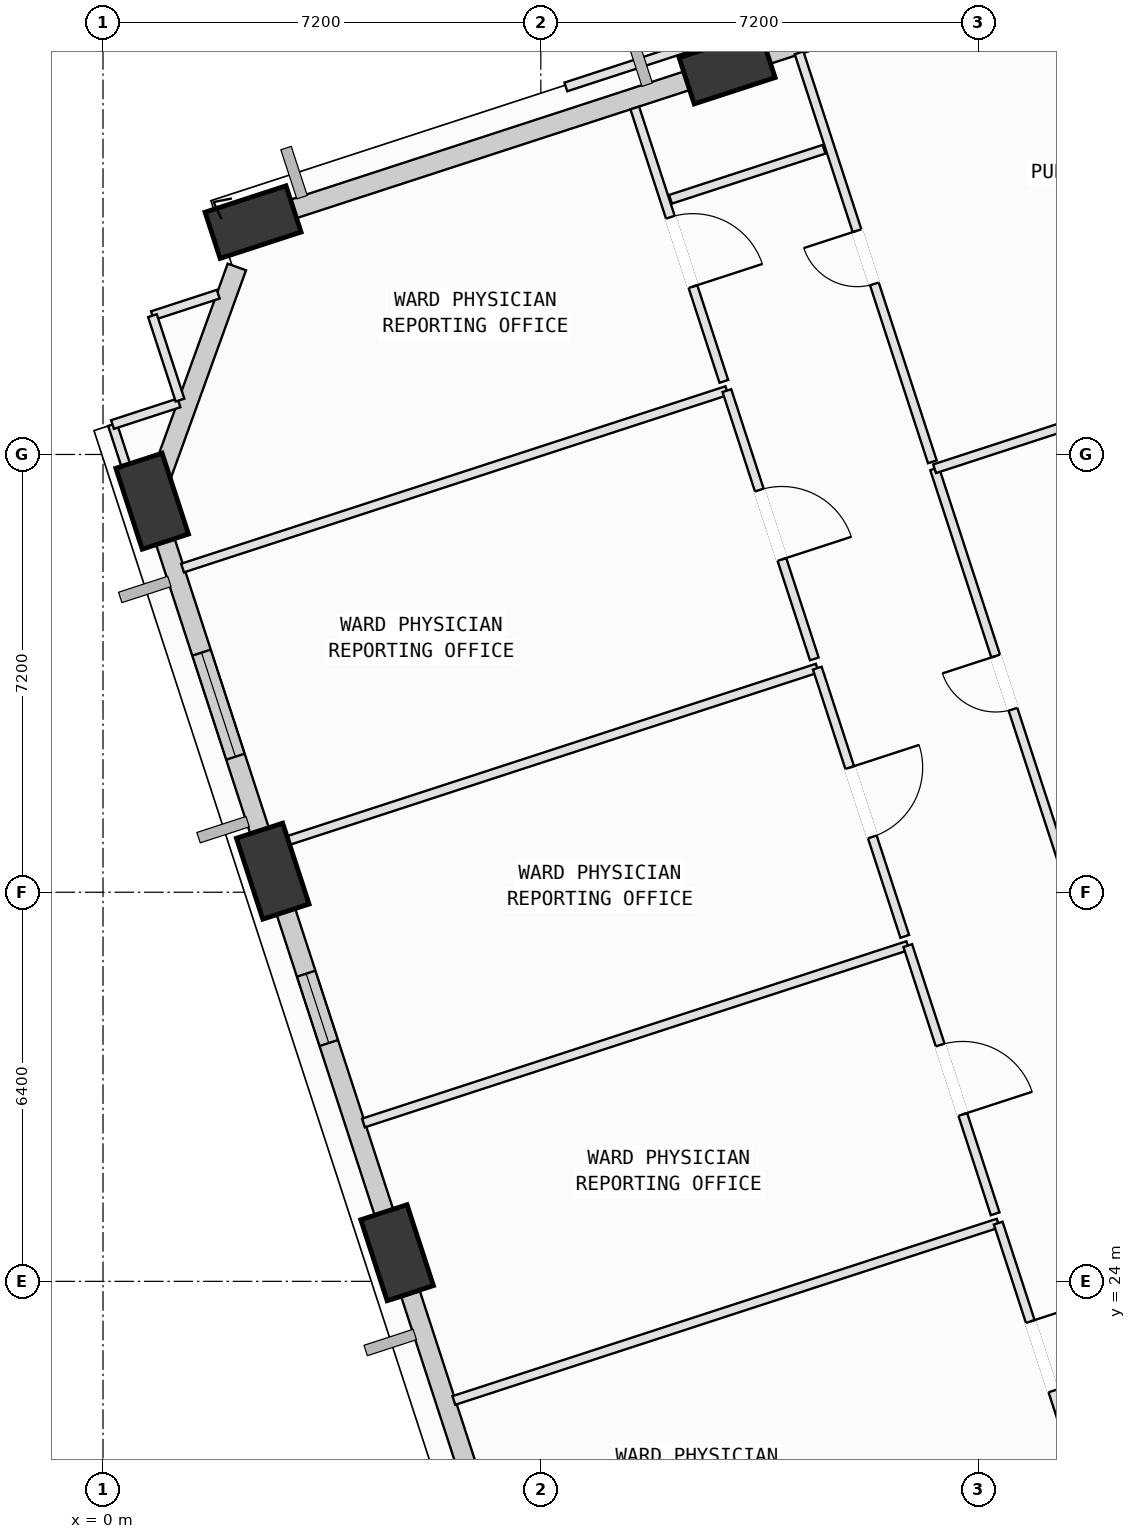
"""IFC4 building model, lengths in metres.
Left out: names, types, materials, properties, quantities, classifications, styles, units other than length and angle.
Written with IfcOpenShell. Run it as: python <this file> out.ifc"""

import sys

from ifc_helpers import new_model, si_unit, direction, frame, frame_2d, origin, origin_2d, place, context, subcontext, project, spatial, rectangle, extrude, element, fill, save


model = new_model("IFC4")
c1 = context("Model", 3, precision=1e-05, world=origin(), true_north=direction((0.0, 1.0)))
c2 = subcontext(c1, "Body", "Model", "MODEL_VIEW")
j1 = project(units=[si_unit("LENGTHUNIT", "METRE"), si_unit("PLANEANGLEUNIT", "RADIAN")], contexts=[c1])
p1 = place(None, origin())
s1 = spatial("IfcSite", under=j1, at=p1, CompositionType="ELEMENT")
p2 = place(p1, origin())
s2 = spatial("IfcBuilding", under=s1, at=p2, CompositionType="ELEMENT")
p3 = place(p2, frame((0.0, 0.0, 100.4)))
s3 = spatial("IfcBuildingStorey", under=s2, at=p3, CompositionType="ELEMENT", Elevation=100.4)
p4 = place(p3, frame((10.264, 43.962, 0.002), z_axis=(-0.078015566554, -0.096625340394, 0.992258592792), x_axis=(0.932899829968, -0.358074339032, 0.038479539664)))
e1 = element("IfcColumn", 1, at=p4, inside=s3, PredefinedType="COLUMN", context=c2, shape_type="SweptSolid", body=[
    extrude(rectangle(XDim=1.4, YDim=0.8, at=origin_2d()), origin(), (0.0, 0.0, 1.0), 4.028),
])
p5 = place(p3, frame((2.468, 41.422, 0.002), z_axis=(-0.067096849195, -0.128269832425, 0.989466958982), x_axis=(0.984588836811, -0.169035568075, 0.044853084086)))
e2 = element("IfcColumn", 2, at=p5, inside=s3, PredefinedType="COLUMN", context=c2, shape_type="SweptSolid", body=[
    extrude(rectangle(XDim=1.4, YDim=0.8, at=origin_2d()), origin(), (0.0, 0.0, 1.0), 4.039),
])
p6 = place(p3, frame((0.808, 36.832, 0.002), z_axis=(-0.048247451694, -0.134947759625, 0.989677364386), x_axis=(0.025024599325, 0.990356943468, 0.136260390255)))
e3 = element("IfcColumn", 3, at=p6, inside=s3, PredefinedType="COLUMN", context=c2, shape_type="SweptSolid", body=[
    extrude(rectangle(XDim=1.4, YDim=0.8, at=origin_2d()), origin(), (0.0, 0.0, 1.0), 4.038),
])
p7 = place(p3, frame((2.791, 30.746, 0.002), z_axis=(-0.0233843297, -0.126796378401, 0.991653090324), x_axis=(-0.133707501978, 0.983409455822, 0.122589339317)))
e4 = element("IfcColumn", 4, at=p7, inside=s3, PredefinedType="COLUMN", context=c2, shape_type="SweptSolid", body=[
    extrude(rectangle(XDim=1.4, YDim=0.8, at=origin_2d()), origin(), (0.0, 0.0, 1.0), 4.03),
])
p8 = place(p3, frame((4.836, 24.471, 0.002), z_axis=(0.002365800756, -0.118350699345, 0.992969040278), x_axis=(-0.328653525962, 0.937720451022, 0.112548725485)))
e5 = element("IfcColumn", 5, at=p8, inside=s3, PredefinedType="COLUMN", context=c2, shape_type="SweptSolid", body=[
    extrude(rectangle(XDim=1.4, YDim=0.8, at=origin_2d()), origin(), (0.0, 0.0, 1.0), 4.025),
])
p9 = place(p3, frame((10.518, 44.045, 0.0), z_axis=(0.0, 0.0, 1.0), x_axis=(0.950785640176, 0.309849425422, 0.0)))
e6 = element("IfcWall", 6, at=p9, inside=s3, PredefinedType="SOLIDWALL", context=c2, shape_type="SweptSolid", body=[
    extrude(rectangle(XDim=7.231, YDim=0.32, at=frame_2d((3.615, 0.0))), origin(), (0.0, 0.0, 1.0), 3.165),
])
p10 = place(p3, frame((2.698, 41.497, 0.0), z_axis=(0.0, 0.0, 1.0), x_axis=(0.950787487315, 0.309843757345, 0.0)))
e7 = element("IfcWall", 7, at=p10, inside=s3, PredefinedType="SOLIDWALL", context=c2, shape_type="SweptSolid", body=[
    extrude(rectangle(XDim=7.271, YDim=0.32, at=frame_2d((3.635, 0.0))), origin(), (0.0, 0.0, 1.0), 3.165),
])
p11 = place(p3, frame((0.878, 37.026, 0.0), z_axis=(0.0, 0.0, 1.0), x_axis=(0.340003812236, 0.940424057362, 0.0)))
e8 = element("IfcWall", 8, at=p11, inside=s3, PredefinedType="SOLIDWALL", context=c2, shape_type="SweptSolid", body=[
    extrude(rectangle(XDim=3.89, YDim=0.32, at=frame_2d((1.945, 0.0))), origin(), (0.0, 0.0, 1.0), 3.165),
])
p12 = place(p3, frame((2.713, 30.986, 0.0), z_axis=(0.0, 0.0, 1.0), x_axis=(-0.309857036537, 0.950783159773, 0.0)))
e9 = element("IfcWall", 9, at=p12, inside=s3, PredefinedType="SOLIDWALL", context=c2, shape_type="SweptSolid", body=[
    extrude(rectangle(XDim=5.456, YDim=0.32, at=frame_2d((2.728, 0.0))), origin(), (0.0, 0.0, 1.0), 3.165),
])
p13 = place(p12, frame((1.728, 0.0, 0.75)))
e10 = element("IfcOpeningElement", 10, at=p13, cuts=e9, PredefinedType="OPENING", context=c2, shape_type="SweptSolid", body=[
    extrude(rectangle(XDim=1.8, YDim=2.05, at=frame_2d((0.9, 1.025))), frame((0.0, 0.17, 0.0), z_axis=(0.0, -1.0, 0.0), x_axis=(1.0, 0.0, 0.0)), (0.0, 0.0, 1.0), 0.34),
])
p14 = place(p3, frame((4.755, 24.722, 0.0), z_axis=(0.0, 0.0, 1.0), x_axis=(-0.309830500862, 0.950791807251, 0.0)))
e11 = element("IfcWall", 11, at=p14, inside=s3, PredefinedType="SOLIDWALL", context=c2, shape_type="SweptSolid", body=[
    extrude(rectangle(XDim=5.628, YDim=0.32, at=frame_2d((2.814, 0.0))), origin(), (0.0, 0.0, 1.0), 3.165),
])
p15 = place(p14, frame((3.363, 0.0, 0.75)))
e12 = element("IfcOpeningElement", 12, at=p15, cuts=e11, PredefinedType="OPENING", context=c2, shape_type="SweptSolid", body=[
    extrude(rectangle(XDim=1.2, YDim=1.75, at=frame_2d((0.6, 0.875))), frame((0.0, 0.17, 0.0), z_axis=(0.0, -1.0, 0.0), x_axis=(1.0, 0.0, 0.0)), (0.0, 0.0, 1.0), 0.34),
])
p16 = place(p3, frame((6.814, 18.404, 0.0), z_axis=(0.0, 0.0, 1.0), x_axis=(-0.309882496641, 0.950774862034, 0.0)))
e13 = element("IfcWall", 13, at=p16, inside=s3, PredefinedType="SOLIDWALL", context=c2, shape_type="SweptSolid", body=[
    extrude(rectangle(XDim=5.662, YDim=0.32, at=frame_2d((2.831, 0.0))), origin(), (0.0, 0.0, 1.0), 3.165),
])
p17 = place(p16, frame((0.986, 0.0, 0.75)))
e14 = element("IfcOpeningElement", 14, at=p17, cuts=e13, PredefinedType="OPENING", context=c2, shape_type="SweptSolid", body=[
    extrude(rectangle(XDim=1.6, YDim=1.95, at=frame_2d((0.8, 0.975))), frame((0.0, 0.17, 0.0), z_axis=(0.0, -1.0, 0.0), x_axis=(1.0, 0.0, 0.0)), (0.0, 0.0, 1.0), 0.34),
])
p18 = place(p3, frame((5.77, 22.041, 0.0), z_axis=(0.0, 0.0, 1.0), x_axis=(0.95079577972, 0.309818310091, 0.0)))
e15 = element("IfcWall", 15, at=p18, inside=s3, PredefinedType="PARTITIONING", context=c2, shape_type="SweptSolid", body=[
    extrude(rectangle(XDim=9.415, YDim=0.15, at=frame_2d((4.708, 0.0))), origin(), (0.0, 0.0, 1.0), 3.78),
])
p19 = place(p3, frame((14.722, 24.958, 0.0), z_axis=(0.0, 0.0, 1.0), x_axis=(0.309905994954, -0.950767202995, 0.0)))
e16 = element("IfcWall", 16, at=p19, inside=s3, PredefinedType="PARTITIONING", context=c2, shape_type="SweptSolid", body=[
    extrude(rectangle(XDim=4.605, YDim=0.15, at=frame_2d((2.302, 0.0))), origin(), (0.0, 0.0, 1.0), 3.78),
])
p20 = place(p19, frame((1.702, 0.0, 0.0)))
e17 = element("IfcOpeningElement", 17, at=p20, cuts=e16, PredefinedType="OPENING", context=c2, shape_type="SweptSolid", body=[
    extrude(rectangle(XDim=1.2, YDim=2.15, at=frame_2d((0.6, 1.075))), frame((0.0, 0.085, 0.0), z_axis=(0.0, -1.0, 0.0), x_axis=(1.0, 0.0, 0.0)), (0.0, 0.0, 1.0), 0.17),
])
p21 = place(p3, frame((4.283, 26.605, 0.0), z_axis=(0.0, 0.0, 1.0), x_axis=(0.950798268634, 0.309810671802, 0.0)))
e18 = element("IfcWall", 18, at=p21, inside=s3, PredefinedType="PARTITIONING", context=c2, shape_type="SweptSolid", body=[
    extrude(rectangle(XDim=9.415, YDim=0.15, at=frame_2d((4.708, 0.0))), origin(), (0.0, 0.0, 1.0), 3.78),
])
p22 = place(p3, frame((13.235, 29.522, 0.0), z_axis=(0.0, 0.0, 1.0), x_axis=(0.309763095605, -0.950813769674, 0.0)))
e19 = element("IfcWall", 19, at=p22, inside=s3, PredefinedType="PARTITIONING", context=c2, shape_type="SweptSolid", body=[
    extrude(rectangle(XDim=4.639, YDim=0.15, at=frame_2d((2.32, 0.0))), origin(), (0.0, 0.0, 1.0), 3.78),
])
p23 = place(p22, frame((1.719, 0.0, 0.0)))
e20 = element("IfcOpeningElement", 20, at=p23, cuts=e19, PredefinedType="OPENING", context=c2, shape_type="SweptSolid", body=[
    extrude(rectangle(XDim=1.2, YDim=2.15, at=frame_2d((0.6, 1.075))), frame((0.0, 0.085, 0.0), z_axis=(0.0, -1.0, 0.0), x_axis=(1.0, 0.0, 0.0)), (0.0, 0.0, 1.0), 0.17),
])
p24 = place(p3, frame((4.841, 23.716, 0.0), z_axis=(0.0, 0.0, 1.0), x_axis=(-0.310630917066, 0.950530606221, 0.0)))
e21 = element("IfcWall", 21, at=p24, inside=s3, PredefinedType="PARTITIONING", context=c2, shape_type="SweptSolid", body=[
    extrude(rectangle(XDim=0.982, YDim=0.15, at=frame_2d((0.491, 0.0))), origin(), (0.0, 0.0, 1.0), 3.165),
])
p25 = place(p3, frame((2.796, 31.169, 0.0), z_axis=(0.0, 0.0, 1.0), x_axis=(0.950788311872, 0.309841227096, 0.0)))
e22 = element("IfcWall", 22, at=p25, inside=s3, PredefinedType="PARTITIONING", context=c2, shape_type="SweptSolid", body=[
    extrude(rectangle(XDim=9.415, YDim=0.15, at=frame_2d((4.707, 0.0))), origin(), (0.0, 0.0, 1.0), 3.78),
])
p26 = place(p3, frame((11.747, 34.086, 0.0), z_axis=(0.0, 0.0, 1.0), x_axis=(0.309891367779, -0.950771970651, 0.0)))
e23 = element("IfcWall", 23, at=p26, inside=s3, PredefinedType="PARTITIONING", context=c2, shape_type="SweptSolid", body=[
    extrude(rectangle(XDim=4.64, YDim=0.15, at=frame_2d((2.32, 0.0))), origin(), (0.0, 0.0, 1.0), 2.965),
])
p27 = place(p26, frame((1.72, 0.0, 0.0)))
e24 = element("IfcOpeningElement", 24, at=p27, cuts=e23, PredefinedType="OPENING", context=c2, shape_type="SweptSolid", body=[
    extrude(rectangle(XDim=1.2, YDim=2.15, at=frame_2d((0.6, 1.075))), frame((0.0, 0.085, 0.0), z_axis=(0.0, -1.0, 0.0), x_axis=(1.0, 0.0, 0.0)), (0.0, 0.0, 1.0), 0.17),
])
p28 = place(p3, frame((2.793, 30.001, 0.0), z_axis=(0.0, 0.0, 1.0), x_axis=(-0.309820989837, 0.950794906516, 0.0)))
e25 = element("IfcWall", 25, at=p28, inside=s3, PredefinedType="PARTITIONING", context=c2, shape_type="SweptSolid", body=[
    extrude(rectangle(XDim=0.961, YDim=0.15, at=frame_2d((0.481, 0.0))), origin(), (0.0, 0.0, 1.0), 3.165),
])
p29 = place(p3, frame((1.308, 35.732, 0.0), z_axis=(0.0, 0.0, 1.0), x_axis=(0.950765222211, 0.309912071778, 0.0)))
e26 = element("IfcWall", 26, at=p29, inside=s3, PredefinedType="PARTITIONING", context=c2, shape_type="SweptSolid", body=[
    extrude(rectangle(XDim=9.416, YDim=0.15, at=frame_2d((4.708, 0.0))), origin(), (0.0, 0.0, 1.0), 3.78),
])
p30 = place(p3, frame((10.26, 38.65, 0.0), z_axis=(0.0, 0.0, 1.0), x_axis=(0.309891367779, -0.950771970651, 0.0)))
e27 = element("IfcWall", 27, at=p30, inside=s3, PredefinedType="PARTITIONING", context=c2, shape_type="SweptSolid", body=[
    extrude(rectangle(XDim=4.64, YDim=0.15, at=frame_2d((2.32, 0.0))), origin(), (0.0, 0.0, 1.0), 2.965),
])
p31 = place(p30, frame((1.72, 0.0, 0.0)))
e28 = element("IfcOpeningElement", 28, at=p31, cuts=e27, PredefinedType="OPENING", context=c2, shape_type="SweptSolid", body=[
    extrude(rectangle(XDim=1.2, YDim=2.15, at=frame_2d((0.6, 1.075))), frame((0.0, 0.085, 0.0), z_axis=(0.0, -1.0, 0.0), x_axis=(1.0, 0.0, 0.0)), (0.0, 0.0, 1.0), 0.17),
])
p32 = place(p3, frame((0.813, 39.883, 0.0), z_axis=(0.0, 0.0, 1.0), x_axis=(0.950680347667, 0.310172333648, 0.0)))
e29 = element("IfcWall", 29, at=p32, inside=s3, PredefinedType="PARTITIONING", context=c2, shape_type="SweptSolid", body=[
    extrude(rectangle(XDim=1.138, YDim=0.15, at=frame_2d((0.569, 0.0))), origin(), (0.0, 0.0, 1.0), 3.78),
])
p33 = place(p3, frame((2.022, 41.014, 0.0), z_axis=(0.0, 0.0, 1.0), x_axis=(0.950635113095, 0.310310943653, 0.0)))
e30 = element("IfcWall", 30, at=p33, inside=s3, PredefinedType="PARTITIONING", context=c2, shape_type="SweptSolid", body=[
    extrude(rectangle(XDim=0.793, YDim=0.15, at=frame_2d((0.396, 0.0))), origin(), (0.0, 0.0, 1.0), 3.165),
])
p34 = place(p3, frame((8.745, 43.299, 0.0), z_axis=(0.0, 0.0, 1.0), x_axis=(0.309716291995, -0.950829016424, 0.0)))
e31 = element("IfcWall", 31, at=p34, inside=s3, PredefinedType="PARTITIONING", context=c2, shape_type="SweptSolid", body=[
    extrude(rectangle(XDim=4.73, YDim=0.15, at=frame_2d((2.365, 0.0))), origin(), (0.0, 0.0, 1.0), 2.965),
])
p35 = place(p34, frame((1.89, 0.0, 0.0)))
e32 = element("IfcOpeningElement", 32, at=p35, cuts=e31, PredefinedType="OPENING", context=c2, shape_type="SweptSolid", body=[
    extrude(rectangle(XDim=1.2, YDim=2.15, at=frame_2d((0.6, 1.075))), frame((0.0, 0.085, 0.0), z_axis=(0.0, -1.0, 0.0), x_axis=(1.0, 0.0, 0.0)), (0.0, 0.0, 1.0), 0.17),
])
p36 = place(p3, frame((0.804, 36.102, 0.0), z_axis=(0.0, 0.0, 1.0), x_axis=(-0.309605670743, 0.950865042287, 0.0)))
e33 = element("IfcWall", 33, at=p36, inside=s3, PredefinedType="PARTITIONING", context=c2, shape_type="SweptSolid", body=[
    extrude(rectangle(XDim=2.093, YDim=0.15, at=frame_2d((1.046, 0.0))), origin(), (0.0, 0.0, 1.0), 3.165),
])
p37 = place(p3, frame((0.156, 38.092, 0.0), z_axis=(0.0, 0.0, 1.0), x_axis=(0.950848165102, 0.309657499379, 0.0)))
e34 = element("IfcWall", 34, at=p37, inside=s3, PredefinedType="PARTITIONING", context=c2, shape_type="SweptSolid", body=[
    extrude(rectangle(XDim=1.149, YDim=0.15, at=frame_2d((0.575, 0.0))), origin(), (0.0, 0.0, 1.0), 3.78),
])
p38 = place(p3, frame((1.266, 38.494, 0.0), z_axis=(0.0, 0.0, 1.0), x_axis=(-0.310105960056, 0.950702000386, 0.0)))
e35 = element("IfcWall", 35, at=p38, inside=s3, PredefinedType="PARTITIONING", context=c2, shape_type="SweptSolid", body=[
    extrude(rectangle(XDim=1.461, YDim=0.15, at=frame_2d((0.73, 0.0))), origin(), (0.0, 0.0, 1.0), 3.78),
])
p39 = place(p3, frame((15.969, 30.329, 0.0), z_axis=(0.0, 0.0, 1.0), x_axis=(-0.309856581724, 0.950783307995, 0.0)))
e36 = element("IfcWall", 36, at=p39, inside=s3, PredefinedType="PARTITIONING", context=c2, shape_type="SweptSolid", body=[
    extrude(rectangle(XDim=7.4, YDim=0.15, at=frame_2d((3.7, 0.0))), origin(), (0.0, 0.0, 1.0), 3.78),
])
p40 = place(p39, frame((3.24, 0.0, 0.0)))
e37 = element("IfcOpeningElement", 37, at=p40, cuts=e36, PredefinedType="OPENING", context=c2, shape_type="SweptSolid", body=[
    extrude(rectangle(XDim=0.92, YDim=2.1, at=frame_2d((0.46, 1.05))), frame((0.0, 0.085, 0.0), z_axis=(0.0, -1.0, 0.0), x_axis=(1.0, 0.0, 0.0)), (0.0, 0.0, 1.0), 0.17),
])
p41 = place(p3, frame((13.676, 37.365, 0.0), z_axis=(0.0, 0.0, 1.0), x_axis=(0.950786483754, 0.309846836859, 0.0)))
e38 = element("IfcWall", 38, at=p41, inside=s3, PredefinedType="PARTITIONING", context=c2, shape_type="SweptSolid", body=[
    extrude(rectangle(XDim=8.365, YDim=0.15, at=frame_2d((4.183, 0.0))), origin(), (0.0, 0.0, 1.0), 3.78),
])
p42 = place(p3, frame((13.639, 37.479, 0.0), z_axis=(0.0, 0.0, 1.0), x_axis=(-0.309802259718, 0.950801009609, 0.0)))
e39 = element("IfcWall", 39, at=p42, inside=s3, PredefinedType="PARTITIONING", context=c2, shape_type="SweptSolid", body=[
    extrude(rectangle(XDim=7.075, YDim=0.15, at=frame_2d((3.538, 0.0))), origin(), (0.0, 0.0, 1.0), 3.78),
])
p43 = place(p42, frame((3.078, 0.0, 0.0)))
e40 = element("IfcOpeningElement", 40, at=p43, cuts=e39, PredefinedType="OPENING", context=c2, shape_type="SweptSolid", body=[
    extrude(rectangle(XDim=0.92, YDim=2.1, at=frame_2d((0.46, 1.05))), frame((0.0, 0.085, 0.0), z_axis=(0.0, -1.0, 0.0), x_axis=(1.0, 0.0, 0.0)), (0.0, 0.0, 1.0), 0.17),
])
p44 = place(p3, frame((7.612, 43.645, 0.0), z_axis=(0.0, 0.0, 1.0), x_axis=(0.950751095858, 0.309955406027, 0.0)))
e41 = element("IfcWall", 41, at=p44, inside=s3, PredefinedType="PARTITIONING", context=c2, shape_type="SweptSolid", body=[
    extrude(rectangle(XDim=5.74, YDim=0.15, at=frame_2d((2.87, 0.0))), origin(), (0.0, 0.0, 1.0), 3.78),
])
p45 = place(p3, frame((11.858, 42.62, 0.0), z_axis=(0.0, 0.0, 1.0), x_axis=(-0.950767532303, -0.309904984664, 0.0)))
e42 = element("IfcWall", 42, at=p45, inside=s3, PredefinedType="PARTITIONING", context=c2, shape_type="SweptSolid", body=[
    extrude(rectangle(XDim=2.656, YDim=0.15, at=frame_2d((1.328, 0.0))), origin(), (0.0, 0.0, 1.0), 3.78),
])
p46 = place(p13, origin())
e43 = element("IfcWindow", 43, at=p46, inside=s3, PartitioningType="SINGLE_PANEL", PredefinedType="WINDOW", context=c2, shape_type="SweptSolid", body=[
    extrude(rectangle(XDim=1.8, YDim=2.05, at=frame_2d((0.9, 1.025))), frame((0.0, 0.03, 0.0), z_axis=(0.0, -1.0, 0.0), x_axis=(1.0, 0.0, 0.0)), (0.0, 0.0, 1.0), 0.06),
])
fill(e10, e43)
p47 = place(p15, origin())
e44 = element("IfcWindow", 44, at=p47, inside=s3, PartitioningType="SINGLE_PANEL", PredefinedType="WINDOW", context=c2, shape_type="SweptSolid", body=[
    extrude(rectangle(XDim=1.2, YDim=1.75, at=frame_2d((0.6, 0.875))), frame((0.0, 0.03, 0.0), z_axis=(0.0, -1.0, 0.0), x_axis=(1.0, 0.0, 0.0)), (0.0, 0.0, 1.0), 0.06),
])
fill(e12, e44)
p48 = place(p20, origin())
e45 = element("IfcDoor", 45, at=p48, inside=s3, OperationType="SINGLE_SWING_LEFT", PredefinedType="DOOR", context=c2, shape_type="SweptSolid", body=[
    extrude(rectangle(XDim=1.2, YDim=2.15, at=frame_2d((0.6, 1.075))), frame((0.0, 0.025, 0.0), z_axis=(0.0, -1.0, 0.0), x_axis=(1.0, 0.0, 0.0)), (0.0, 0.0, 1.0), 0.05),
])
fill(e17, e45)
p49 = place(p23, origin())
e46 = element("IfcDoor", 46, at=p49, inside=s3, OperationType="SINGLE_SWING_RIGHT", PredefinedType="DOOR", context=c2, shape_type="SweptSolid", body=[
    extrude(rectangle(XDim=1.2, YDim=2.15, at=frame_2d((0.6, 1.075))), frame((0.0, 0.025, 0.0), z_axis=(0.0, -1.0, 0.0), x_axis=(1.0, 0.0, 0.0)), (0.0, 0.0, 1.0), 0.05),
])
fill(e20, e46)
p50 = place(p27, origin())
e47 = element("IfcDoor", 47, at=p50, inside=s3, OperationType="SINGLE_SWING_LEFT", PredefinedType="DOOR", context=c2, shape_type="SweptSolid", body=[
    extrude(rectangle(XDim=1.2, YDim=2.15, at=frame_2d((0.6, 1.075))), frame((0.0, 0.025, 0.0), z_axis=(0.0, -1.0, 0.0), x_axis=(1.0, 0.0, 0.0)), (0.0, 0.0, 1.0), 0.05),
])
fill(e24, e47)
p51 = place(p31, origin())
e48 = element("IfcDoor", 48, at=p51, inside=s3, OperationType="SINGLE_SWING_RIGHT", PredefinedType="DOOR", context=c2, shape_type="SweptSolid", body=[
    extrude(rectangle(XDim=1.2, YDim=2.15, at=frame_2d((0.6, 1.075))), frame((0.0, 0.025, 0.0), z_axis=(0.0, -1.0, 0.0), x_axis=(1.0, 0.0, 0.0)), (0.0, 0.0, 1.0), 0.05),
])
fill(e28, e48)
p52 = place(p35, origin())
e49 = element("IfcDoor", 49, at=p52, inside=s3, OperationType="SINGLE_SWING_RIGHT", PredefinedType="DOOR", context=c2, shape_type="SweptSolid", body=[
    extrude(rectangle(XDim=1.2, YDim=2.15, at=frame_2d((0.6, 1.075))), frame((0.0, 0.025, 0.0), z_axis=(0.0, -1.0, 0.0), x_axis=(1.0, 0.0, 0.0)), (0.0, 0.0, 1.0), 0.05),
])
fill(e32, e49)
p53 = place(p40, origin())
e50 = element("IfcDoor", 50, at=p53, inside=s3, OperationType="SINGLE_SWING_RIGHT", PredefinedType="DOOR", context=c2, shape_type="SweptSolid", body=[
    extrude(rectangle(XDim=0.92, YDim=2.1, at=frame_2d((0.46, 1.05))), frame((0.0, 0.025, 0.0), z_axis=(0.0, -1.0, 0.0), x_axis=(1.0, 0.0, 0.0)), (0.0, 0.0, 1.0), 0.05),
])
fill(e37, e50)
p54 = place(p43, origin())
e51 = element("IfcDoor", 51, at=p54, inside=s3, OperationType="SINGLE_SWING_RIGHT", PredefinedType="DOOR", context=c2, shape_type="SweptSolid", body=[
    extrude(rectangle(XDim=0.92, YDim=2.1, at=frame_2d((0.46, 1.05))), frame((0.0, 0.025, 0.0), z_axis=(0.0, -1.0, 0.0), x_axis=(1.0, 0.0, 0.0)), (0.0, 0.0, 1.0), 0.05),
])
fill(e40, e51)
save(model, sys.argv[1])
